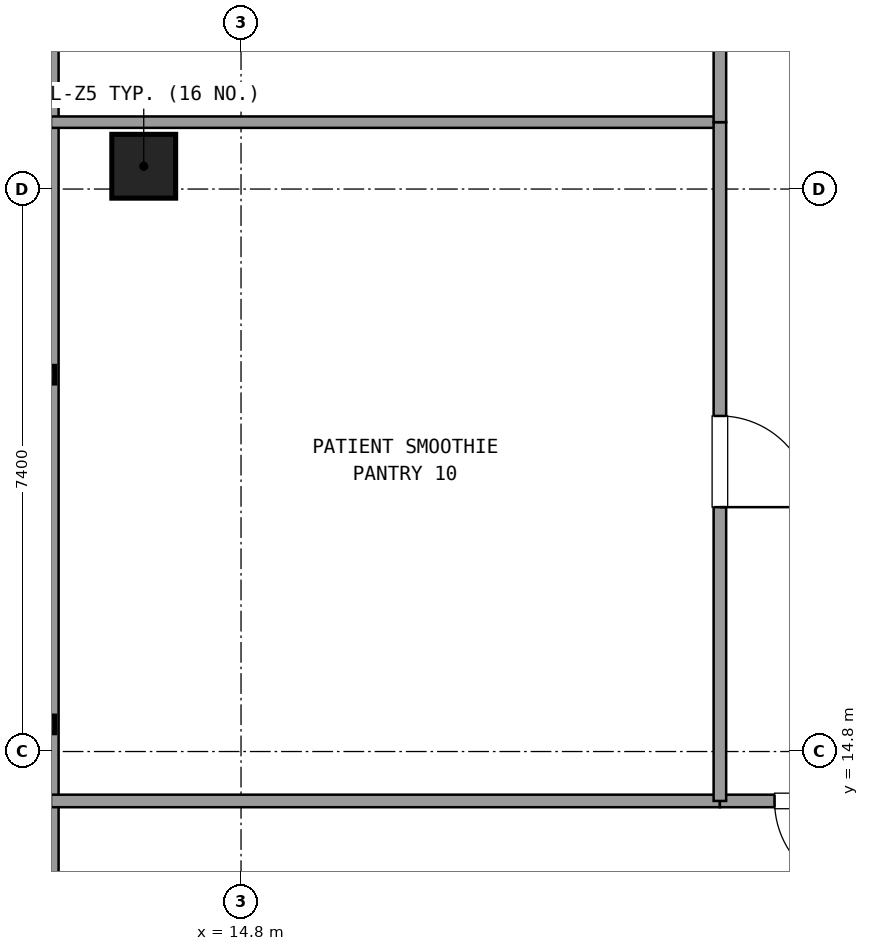
"""IFC4 building model, lengths in metres.
Left out: names, types, materials, properties, quantities, classifications, styles, units other than length and angle.
Written with IfcOpenShell. Run it as: python <this file> out.ifc"""

import sys

from ifc_helpers import new_model, si_unit, direction, frame, frame_2d, origin, origin_2d, place, context, subcontext, project, spatial, rectangle, extrude, element, fill, save


model = new_model("IFC4")
c1 = context("Model", 3, precision=1e-05, world=origin(), true_north=direction((0.0, 1.0)))
c2 = subcontext(c1, "Body", "Model", "MODEL_VIEW")
j1 = project(units=[si_unit("LENGTHUNIT", "METRE"), si_unit("PLANEANGLEUNIT", "RADIAN")], contexts=[c1])
p1 = place(None, origin())
s1 = spatial("IfcSite", under=j1, at=p1, CompositionType="ELEMENT")
p2 = place(p1, origin())
s2 = spatial("IfcBuilding", under=s1, at=p2, CompositionType="ELEMENT")
p3 = place(p2, frame((0.0, 0.0, 271.62)))
s3 = spatial("IfcBuildingStorey", under=s2, at=p3, CompositionType="ELEMENT", Elevation=271.62)
p4 = place(p3, frame((13.52, 22.5, 0.0), z_axis=(0.0, 0.0, 1.0), x_axis=(1.0, 0.0, 0.0)))
e1 = element("IfcColumn", 1, at=p4, inside=s3, PredefinedType="COLUMN", context=c2, shape_type="SweptSolid", body=[
    extrude(rectangle(XDim=0.84, YDim=0.84, at=origin_2d()), origin(), (0.0, 0.0, 1.0), 3.6),
])
p5 = place(p3, frame((12.28, 24.36, 0.0), z_axis=(0.0, 0.0, 1.0), x_axis=(0.0, -1.0, 0.0)))
e2 = element("IfcWall", 2, at=p5, inside=s3, PredefinedType="SOLIDWALL", context=c2, shape_type="SweptSolid", body=[
    extrude(rectangle(XDim=13.805, YDim=0.24, at=frame_2d((6.903, 0.0))), origin(), (0.0, 0.0, 1.0), 0.85),
])
p6 = place(p3, frame((12.3, 14.15, 0.0), z_axis=(0.0, 0.0, 1.0), x_axis=(1.0, 0.0, 0.0)))
e3 = element("IfcWall", 3, at=p6, inside=s3, PredefinedType="PARTITIONING", context=c2, shape_type="SweptSolid", body=[
    extrude(rectangle(XDim=8.8, YDim=0.165, at=frame_2d((4.4, 0.0))), origin(), (0.0, 0.0, 1.0), 2.61),
])
p7 = place(p3, frame((21.1, 14.15, 0.0), z_axis=(0.0, 0.0, 1.0), x_axis=(1.0, 0.0, 0.0)))
e4 = element("IfcWall", 4, at=p7, inside=s3, PredefinedType="PARTITIONING", context=c2, shape_type="SweptSolid", body=[
    extrude(rectangle(XDim=2.639, YDim=0.165, at=frame_2d((1.319, 0.0))), origin(), (0.0, 0.0, 1.0), 2.61),
])
p8 = place(p7, frame((0.719, 0.0, 0.0)))
e5 = element("IfcOpeningElement", 5, at=p8, cuts=e4, PredefinedType="OPENING", context=c2, shape_type="SweptSolid", body=[
    extrude(rectangle(XDim=1.2, YDim=2.15, at=frame_2d((0.6, 1.075))), frame((0.0, 0.093, 0.0), z_axis=(0.0, -1.0, 0.0), x_axis=(1.0, 0.0, 0.0)), (0.0, 0.0, 1.0), 0.185),
])
p9 = place(p3, frame((21.1, 23.08, 0.0), z_axis=(0.0, 0.0, 1.0), x_axis=(-1.0, 0.0, 0.0)))
e6 = element("IfcWall", 6, at=p9, inside=s3, PredefinedType="PARTITIONING", context=c2, shape_type="SweptSolid", body=[
    extrude(rectangle(XDim=8.8, YDim=0.15, at=frame_2d((4.4, 0.0))), origin(), (0.0, 0.0, 1.0), 2.61),
])
p10 = place(p3, frame((21.1, 14.15, 0.0), z_axis=(0.0, 0.0, 1.0), x_axis=(0.0, 1.0, 0.0)))
e7 = element("IfcWall", 7, at=p10, inside=s3, PredefinedType="PARTITIONING", context=c2, shape_type="SweptSolid", body=[
    extrude(rectangle(XDim=8.93, YDim=0.165, at=frame_2d((4.465, 0.0))), origin(), (0.0, 0.0, 1.0), 2.61),
])
p11 = place(p10, frame((3.865, 0.0, 0.0)))
e8 = element("IfcOpeningElement", 8, at=p11, cuts=e7, PredefinedType="OPENING", context=c2, shape_type="SweptSolid", body=[
    extrude(rectangle(XDim=1.2, YDim=2.15, at=frame_2d((0.6, 1.075))), frame((0.0, 0.093, 0.0), z_axis=(0.0, -1.0, 0.0), x_axis=(1.0, 0.0, 0.0)), (0.0, 0.0, 1.0), 0.185),
])
p12 = place(p3, frame((21.1, 23.08, 0.0), z_axis=(0.0, 0.0, 1.0), x_axis=(0.0, 1.0, 0.0)))
e9 = element("IfcWall", 9, at=p12, inside=s3, PredefinedType="PARTITIONING", context=c2, shape_type="SweptSolid", body=[
    extrude(rectangle(XDim=7.755, YDim=0.165, at=frame_2d((3.877, 0.0))), origin(), (0.0, 0.0, 1.0), 2.61),
])
p13 = place(p12, frame((3.278, 0.0, 0.0)))
e10 = element("IfcOpeningElement", 10, at=p13, cuts=e9, PredefinedType="OPENING", context=c2, shape_type="SweptSolid", body=[
    extrude(rectangle(XDim=1.2, YDim=2.15, at=frame_2d((0.6, 1.075))), frame((0.0, 0.093, 0.0), z_axis=(0.0, -1.0, 0.0), x_axis=(1.0, 0.0, 0.0)), (0.0, 0.0, 1.0), 0.185),
])
p14 = place(p8, frame((1.2, 0.0, 0.0), z_axis=(0.0, 0.0, 1.0), x_axis=(-1.0, 0.0, 0.0)))
e11 = element("IfcDoor", 11, at=p14, inside=s3, OperationType="SINGLE_SWING_RIGHT", PredefinedType="DOOR", context=c2, shape_type="SweptSolid", body=[
    extrude(rectangle(XDim=1.2, YDim=2.15, at=frame_2d((0.6, 1.075))), frame((0.0, 0.025, 0.0), z_axis=(0.0, -1.0, 0.0), x_axis=(1.0, 0.0, 0.0)), (0.0, 0.0, 1.0), 0.05),
])
fill(e5, e11)
p15 = place(p11, frame((1.2, 0.0, 0.0), z_axis=(0.0, 0.0, 1.0), x_axis=(-1.0, 0.0, 0.0)))
e12 = element("IfcDoor", 12, at=p15, inside=s3, OperationType="SINGLE_SWING_LEFT", PredefinedType="DOOR", context=c2, shape_type="SweptSolid", body=[
    extrude(rectangle(XDim=1.2, YDim=2.15, at=frame_2d((0.6, 1.075))), frame((0.0, 0.025, 0.0), z_axis=(0.0, -1.0, 0.0), x_axis=(1.0, 0.0, 0.0)), (0.0, 0.0, 1.0), 0.05),
])
fill(e8, e12)
save(model, sys.argv[1])
